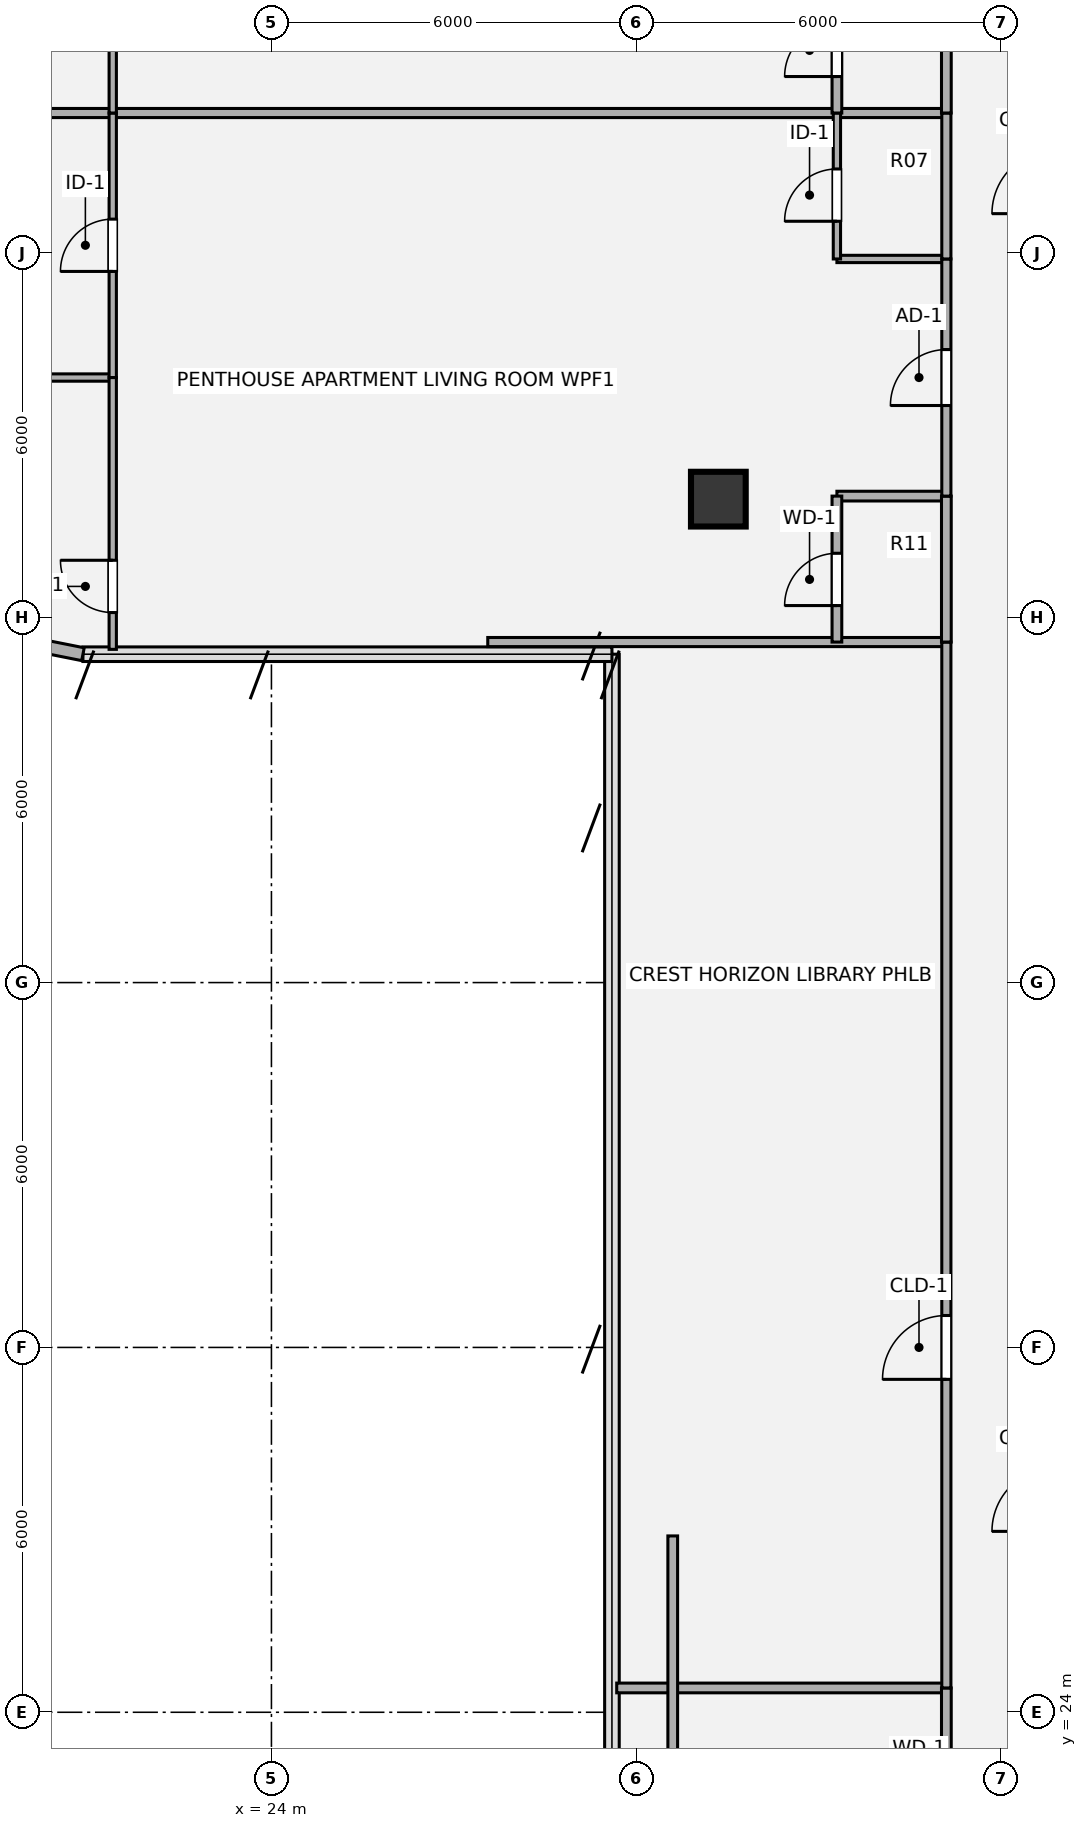
"""IFC4 building model, lengths in metres.
Left out: names, types, materials, properties, quantities, classifications, styles, units other than length and angle.
Written with IfcOpenShell. Run it as: python <this file> out.ifc"""

import sys

from ifc_helpers import new_model, si_unit, direction, frame, frame_2d, origin, origin_2d, place, context, subcontext, project, spatial, rectangle, hollow_circle, extrude, source, transform, mapped, element, fill, save


model = new_model("IFC4")
c1 = context("Model", 3, precision=1e-05, world=origin(), true_north=direction((0.0, 1.0)))
c2 = subcontext(c1, "Body", "Model", "MODEL_VIEW")
j1 = project(units=[si_unit("LENGTHUNIT", "METRE"), si_unit("PLANEANGLEUNIT", "RADIAN")], contexts=[c1])
p1 = place(None, origin())
s1 = spatial("IfcSite", under=j1, at=p1, CompositionType="ELEMENT")
p2 = place(p1, origin())
s2 = spatial("IfcBuilding", under=s1, at=p2, CompositionType="ELEMENT")
p3 = place(p2, frame((0.0, 0.0, 283.5)))
s3 = spatial("IfcBuildingStorey", under=s2, at=p3, CompositionType="ELEMENT", Elevation=283.5)
m1 = source(origin(), c2, "Body", "SweptSolid", [
    extrude(hollow_circle(Radius=0.45, WallThickness=0.032, at=origin_2d()), origin(), (0.0, 0.0, 1.0), 3.78),
])
p4 = place(p3, frame((31.35, 43.95, 0.0), z_axis=(0.0, 0.0, 1.0), x_axis=(1.0, 0.0, 0.0)))
e1 = element("IfcColumn", 1, at=p4, inside=s3, PredefinedType="COLUMN", context=c2, shape_type="MappedRepresentation", body=[
    mapped(m1, transform((0.0, 0.0, 0.0), x_axis=(1.0, 0.0, 0.0), y_axis=(0.0, 1.0, 0.0), z_axis=(0.0, 0.0, 1.0), scale=1.0)),
])
p5 = place(p3, frame((20.9, 41.4, 0.0), z_axis=(0.0, 0.0, 1.0), x_axis=(-0.980775717779, 0.195138390419, 0.0)))
e2 = element("IfcWall", 2, at=p5, inside=s3, PredefinedType="SOLIDWALL", context=c2, shape_type="SweptSolid", body=[
    extrude(rectangle(XDim=1.249, YDim=0.215, at=frame_2d((0.624, 0.0))), origin(), (0.0, 0.0, 1.0), 3.53),
])
p6 = place(p3, frame((29.679, 24.4, 0.0), z_axis=(0.0, 0.0, 1.0), x_axis=(1.0, 0.0, 0.0)))
e3 = element("IfcWall", 3, at=p6, inside=s3, PredefinedType="PLUMBINGWALL", context=c2, shape_type="SweptSolid", body=[
    extrude(rectangle(XDim=5.421, YDim=0.16, at=frame_2d((2.711, 0.0))), origin(), (0.0, 0.0, 1.0), 3.5),
])
p7 = place(p3, frame((27.558, 41.6, 0.0), z_axis=(0.0, 0.0, 1.0), x_axis=(1.0, 0.0, 0.0)))
e4 = element("IfcWall", 4, at=p7, inside=s3, PredefinedType="PARTITIONING", context=c2, shape_type="SweptSolid", body=[
    extrude(rectangle(XDim=7.542, YDim=0.15, at=frame_2d((3.771, 0.0))), origin(), (0.0, 0.0, 1.0), 3.5),
])
p8 = place(p3, frame((33.3, 44.0, 0.0), z_axis=(0.0, 0.0, 1.0), x_axis=(1.0, 0.0, 0.0)))
e5 = element("IfcWall", 5, at=p8, inside=s3, PredefinedType="PLUMBINGWALL", context=c2, shape_type="SweptSolid", body=[
    extrude(rectangle(XDim=1.8, YDim=0.16, at=frame_2d((0.9, 0.0))), origin(), (0.0, 0.0, 1.0), 2.903),
])
p9 = place(p3, frame((17.78, 45.95, 0.0), z_axis=(0.0, 0.0, 1.0), x_axis=(1.0, 0.0, 0.0)))
e6 = element("IfcWall", 6, at=p9, inside=s3, PredefinedType="PARTITIONING", context=c2, shape_type="SweptSolid", body=[
    extrude(rectangle(XDim=3.61, YDim=0.12, at=frame_2d((1.805, 0.0))), origin(), (0.0, 0.0, 1.0), 2.982),
])
p10 = place(p3, frame((33.3, 47.9, 0.0), z_axis=(0.0, 0.0, 1.0), x_axis=(1.0, 0.0, 0.0)))
e7 = element("IfcWall", 7, at=p10, inside=s3, PredefinedType="PARTITIONING", context=c2, shape_type="SweptSolid", body=[
    extrude(rectangle(XDim=1.8, YDim=0.12, at=frame_2d((0.9, 0.0))), origin(), (0.0, 0.0, 1.0), 3.259),
])
p11 = place(p3, frame((17.78, 50.3, 0.0), z_axis=(0.0, 0.0, 1.0), x_axis=(1.0, 0.0, 0.0)))
e8 = element("IfcWall", 8, at=p11, inside=s3, PredefinedType="PARTITIONING", context=c2, shape_type="SweptSolid", body=[
    extrude(rectangle(XDim=17.32, YDim=0.15, at=frame_2d((8.66, 0.0))), origin(), (0.0, 0.0, 1.0), 2.982),
])
p12 = place(p3, frame((21.39, 41.48, 0.0), z_axis=(0.0, 0.0, 1.0), x_axis=(0.0, 1.0, 0.0)))
e9 = element("IfcWall", 9, at=p12, inside=s3, PredefinedType="PARTITIONING", context=c2, shape_type="SweptSolid", body=[
    extrude(rectangle(XDim=4.47, YDim=0.12, at=frame_2d((2.235, 0.0))), origin(), (0.0, 0.0, 1.0), 3.5),
])
p13 = place(p12, frame((0.605, 0.0, 0.0)))
e10 = element("IfcOpeningElement", 10, at=p13, cuts=e9, PredefinedType="OPENING", context=c2, shape_type="SweptSolid", body=[
    extrude(rectangle(XDim=0.86, YDim=2.1, at=origin_2d()), frame((0.43, 0.07, 1.05), z_axis=(0.0, -1.0, 0.0), x_axis=(1.0, 0.0, 0.0)), (0.0, 0.0, 1.0), 0.14),
])
p14 = place(p3, frame((21.39, 45.95, 0.0), z_axis=(0.0, 0.0, 1.0), x_axis=(0.0, 1.0, 0.0)))
e11 = element("IfcWall", 11, at=p14, inside=s3, PredefinedType="PARTITIONING", context=c2, shape_type="SweptSolid", body=[
    extrude(rectangle(XDim=4.35, YDim=0.12, at=frame_2d((2.175, 0.0))), origin(), (0.0, 0.0, 1.0), 3.5),
])
p15 = place(p14, frame((1.745, 0.0, 0.0)))
e12 = element("IfcOpeningElement", 12, at=p15, cuts=e11, PredefinedType="OPENING", context=c2, shape_type="SweptSolid", body=[
    extrude(rectangle(XDim=0.86, YDim=2.1, at=origin_2d()), frame((0.43, 0.07, 1.05), z_axis=(0.0, -1.0, 0.0), x_axis=(1.0, 0.0, 0.0)), (0.0, 0.0, 1.0), 0.14),
])
p16 = place(p3, frame((21.39, 50.3, 0.0), z_axis=(0.0, 0.0, 1.0), x_axis=(0.0, 1.0, 0.0)))
e13 = element("IfcWall", 13, at=p16, inside=s3, PredefinedType="PARTITIONING", context=c2, shape_type="SweptSolid", body=[
    extrude(rectangle(XDim=4.35, YDim=0.12, at=frame_2d((2.175, 0.0))), origin(), (0.0, 0.0, 1.0), 3.5),
])
p17 = place(p16, frame((1.745, 0.0, 0.0)))
e14 = element("IfcOpeningElement", 14, at=p17, cuts=e13, PredefinedType="OPENING", context=c2, shape_type="SweptSolid", body=[
    extrude(rectangle(XDim=0.86, YDim=2.1, at=origin_2d()), frame((0.43, 0.07, 1.05), z_axis=(0.0, -1.0, 0.0), x_axis=(1.0, 0.0, 0.0)), (0.0, 0.0, 1.0), 0.14),
])
p18 = place(p3, frame((30.6, 20.4, 0.0), z_axis=(0.0, 0.0, 1.0), x_axis=(0.0, 1.0, 0.0)))
e15 = element("IfcWall", 15, at=p18, inside=s3, PredefinedType="PLUMBINGWALL", context=c2, shape_type="SweptSolid", body=[
    extrude(rectangle(XDim=6.5, YDim=0.16, at=frame_2d((3.25, 0.0))), origin(), (0.0, 0.0, 1.0), 2.815),
])
p19 = place(p3, frame((33.3, 41.6, 0.0), z_axis=(0.0, 0.0, 1.0), x_axis=(0.0, 1.0, 0.0)))
e16 = element("IfcWall", 16, at=p19, inside=s3, PredefinedType="PLUMBINGWALL", context=c2, shape_type="SweptSolid", body=[
    extrude(rectangle(XDim=2.4, YDim=0.16, at=frame_2d((1.2, 0.0))), origin(), (0.0, 0.0, 1.0), 3.5),
])
p20 = place(p19, frame((0.6, 0.0, 0.0)))
e17 = element("IfcOpeningElement", 17, at=p20, cuts=e16, PredefinedType="OPENING", context=c2, shape_type="SweptSolid", body=[
    extrude(rectangle(XDim=0.86, YDim=2.1, at=origin_2d()), frame((0.43, 0.09, 1.05), z_axis=(0.0, -1.0, 0.0), x_axis=(1.0, 0.0, 0.0)), (0.0, 0.0, 1.0), 0.18),
])
p21 = place(p3, frame((33.3, 47.9, 0.0), z_axis=(0.0, 0.0, 1.0), x_axis=(0.0, 1.0, 0.0)))
e18 = element("IfcWall", 18, at=p21, inside=s3, PredefinedType="PARTITIONING", context=c2, shape_type="SweptSolid", body=[
    extrude(rectangle(XDim=2.4, YDim=0.12, at=frame_2d((1.2, 0.0))), origin(), (0.0, 0.0, 1.0), 3.5),
])
p22 = place(p21, frame((0.62, 0.0, 0.0)))
e19 = element("IfcOpeningElement", 19, at=p22, cuts=e18, PredefinedType="OPENING", context=c2, shape_type="SweptSolid", body=[
    extrude(rectangle(XDim=0.86, YDim=2.1, at=origin_2d()), frame((0.43, 0.07, 1.05), z_axis=(0.0, -1.0, 0.0), x_axis=(1.0, 0.0, 0.0)), (0.0, 0.0, 1.0), 0.14),
])
p23 = place(p3, frame((33.3, 50.3, 0.0), z_axis=(0.0, 0.0, 1.0), x_axis=(0.0, 1.0, 0.0)))
e20 = element("IfcWall", 20, at=p23, inside=s3, PredefinedType="PLUMBINGWALL", context=c2, shape_type="SweptSolid", body=[
    extrude(rectangle(XDim=2.4, YDim=0.16, at=frame_2d((1.2, 0.0))), origin(), (0.0, 0.0, 1.0), 3.5),
])
p24 = place(p23, frame((0.6, 0.0, 0.0)))
e21 = element("IfcOpeningElement", 21, at=p24, cuts=e20, PredefinedType="OPENING", context=c2, shape_type="SweptSolid", body=[
    extrude(rectangle(XDim=0.86, YDim=2.1, at=origin_2d()), frame((0.43, 0.09, 1.05), z_axis=(0.0, -1.0, 0.0), x_axis=(1.0, 0.0, 0.0)), (0.0, 0.0, 1.0), 0.18),
])
p25 = place(p3, frame((35.1, 20.4, 0.0), z_axis=(0.0, 0.0, 1.0), x_axis=(0.0, 1.0, 0.0)))
e22 = element("IfcWall", 22, at=p25, inside=s3, PredefinedType="PLUMBINGWALL", context=c2, shape_type="SweptSolid", body=[
    extrude(rectangle(XDim=4.0, YDim=0.16, at=frame_2d((2.0, 0.0))), origin(), (0.0, 0.0, 1.0), 3.5),
])
p26 = place(p25, frame((1.57, 0.0, 0.0)))
e23 = element("IfcOpeningElement", 23, at=p26, cuts=e22, PredefinedType="OPENING", context=c2, shape_type="SweptSolid", body=[
    extrude(rectangle(XDim=0.86, YDim=2.1, at=origin_2d()), frame((0.43, 0.09, 1.05), z_axis=(0.0, -1.0, 0.0), x_axis=(1.0, 0.0, 0.0)), (0.0, 0.0, 1.0), 0.18),
])
p27 = place(p3, frame((35.1, 24.4, 0.0), z_axis=(0.0, 0.0, 1.0), x_axis=(0.0, 1.0, 0.0)))
e24 = element("IfcWall", 24, at=p27, inside=s3, PredefinedType="PARTITIONING", context=c2, shape_type="SweptSolid", body=[
    extrude(rectangle(XDim=17.2, YDim=0.15, at=frame_2d((8.6, 0.0))), origin(), (0.0, 0.0, 1.0), 3.5),
])
p28 = place(p27, frame((5.075, 0.0, 0.0)))
e25 = element("IfcOpeningElement", 25, at=p28, cuts=e24, PredefinedType="OPENING", context=c2, shape_type="SweptSolid", body=[
    extrude(rectangle(XDim=1.05, YDim=2.1, at=origin_2d()), frame((0.525, 0.085, 1.05), z_axis=(0.0, -1.0, 0.0), x_axis=(1.0, 0.0, 0.0)), (0.0, 0.0, 1.0), 0.17),
])
p29 = place(p3, frame((35.1, 41.6, 0.0), z_axis=(0.0, 0.0, 1.0), x_axis=(0.0, 1.0, 0.0)))
e26 = element("IfcWall", 26, at=p29, inside=s3, PredefinedType="PLUMBINGWALL", context=c2, shape_type="SweptSolid", body=[
    extrude(rectangle(XDim=2.4, YDim=0.16, at=frame_2d((1.2, 0.0))), origin(), (0.0, 0.0, 1.0), 3.5),
])
p30 = place(p3, frame((35.1, 44.0, 0.0), z_axis=(0.0, 0.0, 1.0), x_axis=(0.0, 1.0, 0.0)))
e27 = element("IfcWall", 27, at=p30, inside=s3, PredefinedType="PARTITIONING", context=c2, shape_type="SweptSolid", body=[
    extrude(rectangle(XDim=3.9, YDim=0.15, at=frame_2d((1.95, 0.0))), origin(), (0.0, 0.0, 1.0), 3.5),
])
p31 = place(p30, frame((1.49, 0.0, 0.0)))
e28 = element("IfcOpeningElement", 28, at=p31, cuts=e27, PredefinedType="OPENING", context=c2, shape_type="SweptSolid", body=[
    extrude(rectangle(XDim=0.92, YDim=2.1, at=origin_2d()), frame((0.46, 0.085, 1.05), z_axis=(0.0, -1.0, 0.0), x_axis=(1.0, 0.0, 0.0)), (0.0, 0.0, 1.0), 0.17),
])
p32 = place(p3, frame((35.1, 47.9, 0.0), z_axis=(0.0, 0.0, 1.0), x_axis=(0.0, 1.0, 0.0)))
e29 = element("IfcWall", 29, at=p32, inside=s3, PredefinedType="PARTITIONING", context=c2, shape_type="SweptSolid", body=[
    extrude(rectangle(XDim=2.4, YDim=0.15, at=frame_2d((1.2, 0.0))), origin(), (0.0, 0.0, 1.0), 3.5),
])
p33 = place(p3, frame((35.1, 50.3, 0.0), z_axis=(0.0, 0.0, 1.0), x_axis=(0.0, 1.0, 0.0)))
e30 = element("IfcWall", 30, at=p33, inside=s3, PredefinedType="PLUMBINGWALL", context=c2, shape_type="SweptSolid", body=[
    extrude(rectangle(XDim=2.4, YDim=0.16, at=frame_2d((1.2, 0.0))), origin(), (0.0, 0.0, 1.0), 3.5),
])
m2 = source(origin(), c2, "Body", "SweptSolid", [
    extrude(rectangle(XDim=0.86, YDim=2.1, at=origin_2d()), frame((0.43, 0.025, 1.05), z_axis=(0.0, -1.0, 0.0), x_axis=(1.0, 0.0, 0.0)), (0.0, 0.0, 1.0), 0.05),
])
p34 = place(p13, origin())
e31 = element("IfcDoor", 31, at=p34, inside=s3, OperationType="SINGLE_SWING_RIGHT", PredefinedType="DOOR", context=c2, shape_type="MappedRepresentation", body=[
    mapped(m2, transform((0.0, 0.0, 0.0), x_axis=(1.0, 0.0, 0.0), y_axis=(0.0, 1.0, 0.0), z_axis=(0.0, 0.0, 1.0), scale=1.0)),
])
fill(e10, e31)
p35 = place(p15, origin())
e32 = element("IfcDoor", 32, at=p35, inside=s3, OperationType="SINGLE_SWING_LEFT", PredefinedType="DOOR", context=c2, shape_type="MappedRepresentation", body=[
    mapped(m2, transform((0.0, 0.0, 0.0), x_axis=(1.0, 0.0, 0.0), y_axis=(0.0, 1.0, 0.0), z_axis=(0.0, 0.0, 1.0), scale=1.0)),
])
fill(e12, e32)
m3 = source(origin(), c2, "Body", "SweptSolid", [
    extrude(rectangle(XDim=0.86, YDim=2.1, at=origin_2d()), frame((0.43, 0.025, 1.05), z_axis=(0.0, -1.0, 0.0), x_axis=(1.0, 0.0, 0.0)), (0.0, 0.0, 1.0), 0.05),
])
p36 = place(p20, origin())
e33 = element("IfcDoor", 33, at=p36, inside=s3, OperationType="SINGLE_SWING_LEFT", PredefinedType="DOOR", context=c2, shape_type="MappedRepresentation", body=[
    mapped(m3, transform((0.0, 0.0, 0.0), x_axis=(1.0, 0.0, 0.0), y_axis=(0.0, 1.0, 0.0), z_axis=(0.0, 0.0, 1.0), scale=1.0)),
])
fill(e17, e33)
p37 = place(p22, origin())
e34 = element("IfcDoor", 34, at=p37, inside=s3, OperationType="SINGLE_SWING_LEFT", PredefinedType="DOOR", context=c2, shape_type="MappedRepresentation", body=[
    mapped(m2, transform((0.0, 0.0, 0.0), x_axis=(1.0, 0.0, 0.0), y_axis=(0.0, 1.0, 0.0), z_axis=(0.0, 0.0, 1.0), scale=1.0)),
])
fill(e19, e34)
p38 = place(p24, origin())
e35 = element("IfcDoor", 35, at=p38, inside=s3, OperationType="SINGLE_SWING_LEFT", PredefinedType="DOOR", context=c2, shape_type="MappedRepresentation", body=[
    mapped(m3, transform((0.0, 0.0, 0.0), x_axis=(1.0, 0.0, 0.0), y_axis=(0.0, 1.0, 0.0), z_axis=(0.0, 0.0, 1.0), scale=1.0)),
])
fill(e21, e35)
m4 = source(origin(), c2, "Body", "SweptSolid", [
    extrude(rectangle(XDim=1.05, YDim=2.1, at=origin_2d()), frame((0.525, 0.025, 1.05), z_axis=(0.0, -1.0, 0.0), x_axis=(1.0, 0.0, 0.0)), (0.0, 0.0, 1.0), 0.05),
])
p39 = place(p28, origin())
e36 = element("IfcDoor", 36, at=p39, inside=s3, OperationType="SINGLE_SWING_LEFT", PredefinedType="DOOR", context=c2, shape_type="MappedRepresentation", body=[
    mapped(m4, transform((0.0, 0.0, 0.0), x_axis=(1.0, 0.0, 0.0), y_axis=(0.0, 1.0, 0.0), z_axis=(0.0, 0.0, 1.0), scale=1.0)),
])
fill(e25, e36)
m5 = source(origin(), c2, "Body", "SweptSolid", [
    extrude(rectangle(XDim=0.92, YDim=2.1, at=origin_2d()), frame((0.46, 0.025, 1.05), z_axis=(0.0, -1.0, 0.0), x_axis=(1.0, 0.0, 0.0)), (0.0, 0.0, 1.0), 0.05),
])
p40 = place(p31, origin())
e37 = element("IfcDoor", 37, at=p40, inside=s3, OperationType="SINGLE_SWING_LEFT", PredefinedType="DOOR", context=c2, shape_type="MappedRepresentation", body=[
    mapped(m5, transform((0.0, 0.0, 0.0), x_axis=(1.0, 0.0, 0.0), y_axis=(0.0, 1.0, 0.0), z_axis=(0.0, 0.0, 1.0), scale=1.0)),
])
fill(e28, e37)
save(model, sys.argv[1])
